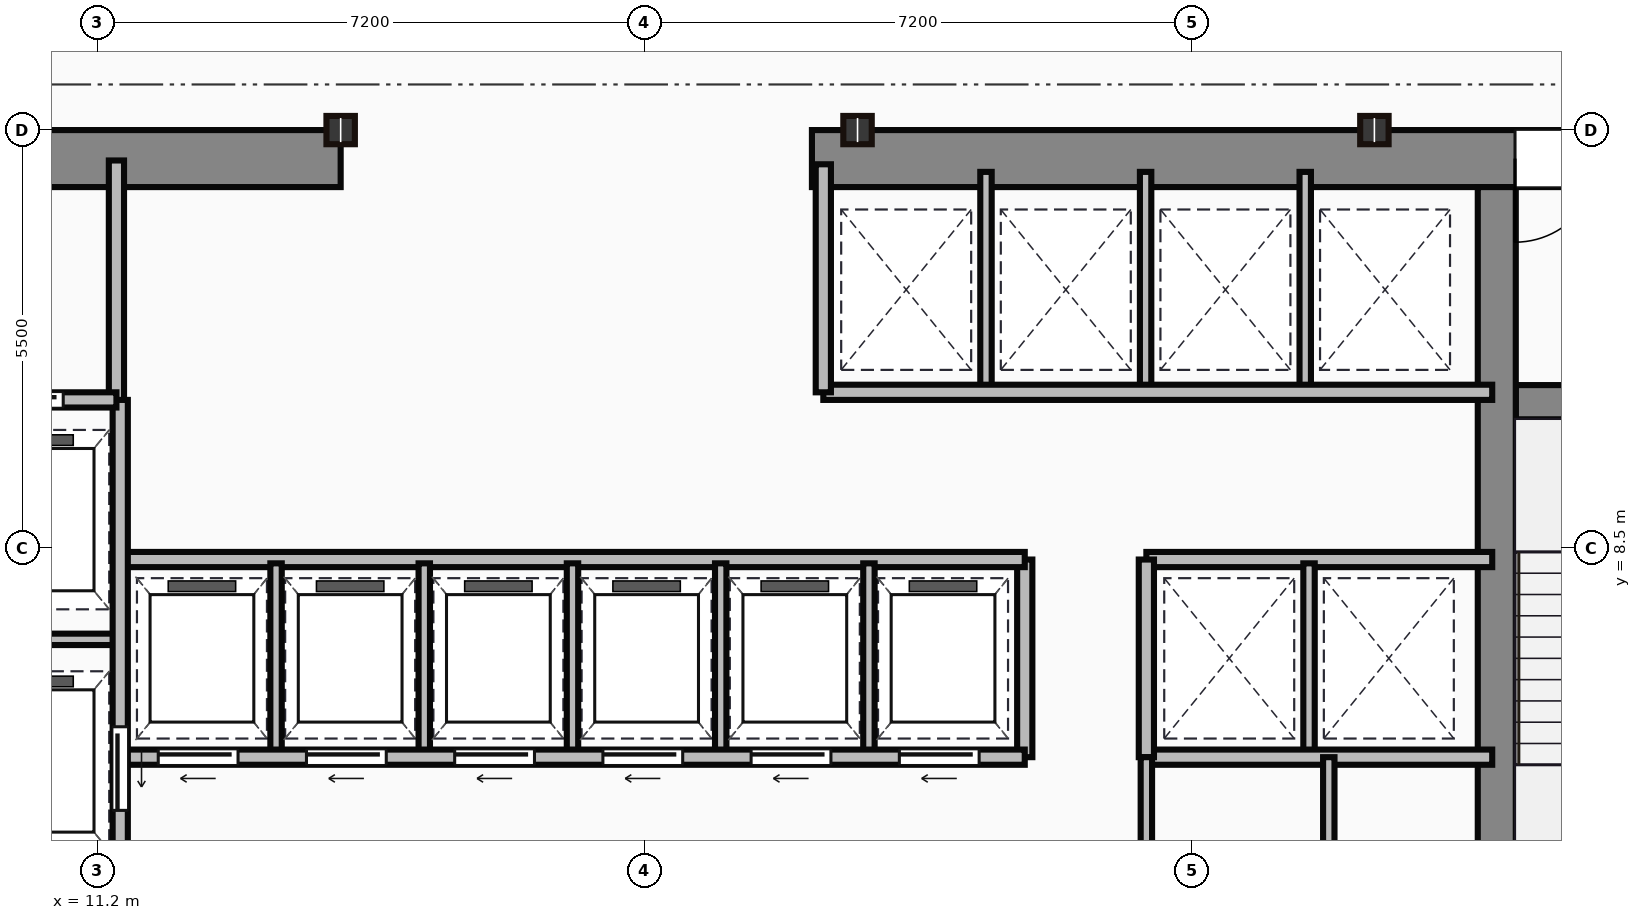
"""IFC4 building model, lengths in metres.
Left out: names, types, materials, properties, quantities, classifications, styles, units other than length and angle.
Written with IfcOpenShell. Run it as: python <this file> out.ifc"""

import sys

from ifc_helpers import new_model, si_unit, direction, frame, frame_2d, origin, origin_2d, place, context, subcontext, project, spatial, rectangle, i_section, extrude, source, transform, mapped, element, fill, save


model = new_model("IFC4")
c1 = context("Model", 3, precision=1e-05, world=origin(), true_north=direction((0.0, 1.0)))
c2 = subcontext(c1, "Body", "Model", "MODEL_VIEW")
j1 = project(units=[si_unit("LENGTHUNIT", "METRE"), si_unit("PLANEANGLEUNIT", "RADIAN")], contexts=[c1])
p1 = place(None, origin())
s1 = spatial("IfcSite", under=j1, at=p1, CompositionType="ELEMENT")
p2 = place(p1, origin())
s2 = spatial("IfcBuilding", under=s1, at=p2, CompositionType="ELEMENT")
p3 = place(p2, frame((0.0, 0.0, 162.5)))
s3 = spatial("IfcBuildingStorey", under=s2, at=p3, CompositionType="ELEMENT", Elevation=162.5)
m1 = source(origin(), c2, "Body", "SweptSolid", [
    extrude(rectangle(XDim=9.1, YDim=0.75, at=frame_2d((4.55, 0.0))), origin(), (0.0, 0.0, 1.0), 3.65),
])
p4 = place(p3, frame((5.3, 13.625, 0.0), z_axis=(0.0, 0.0, 1.0), x_axis=(1.0, 0.0, 0.0)))
e1 = element("IfcWall", 1, at=p4, inside=s3, PredefinedType="SHEAR", context=c2, shape_type="MappedRepresentation", body=[
    mapped(m1, transform((0.0, 0.0, 0.0))),
])
p5 = place(p4, frame((4.1, 0.0, 0.0)))
e2 = element("IfcOpeningElement", 2, at=p5, cuts=e1, PredefinedType="OPENING", context=c2, shape_type="SweptSolid", body=[
    extrude(rectangle(XDim=1.1, YDim=2.15, at=frame_2d((0.55, 1.075))), frame((0.0, 0.385, 0.0), z_axis=(0.0, -1.0, 0.0), x_axis=(1.0, 0.0, 0.0)), (0.0, 0.0, 1.0), 0.77),
])
m2 = source(origin(), c2, "Body", "SweptSolid", [
    extrude(rectangle(XDim=12.6, YDim=0.75, at=frame_2d((6.3, 0.0))), origin(), (0.0, 0.0, 1.0), 3.65),
])
p6 = place(p3, frame((20.6, 13.625, 0.0), z_axis=(0.0, 0.0, 1.0), x_axis=(1.0, 0.0, 0.0)))
e3 = element("IfcWall", 3, at=p6, inside=s3, PredefinedType="SHEAR", context=c2, shape_type="MappedRepresentation", body=[
    mapped(m2, transform((0.0, 0.0, 0.0))),
])
p7 = place(p6, frame((9.25, 0.0, 0.0)))
e4 = element("IfcOpeningElement", 4, at=p7, cuts=e3, PredefinedType="OPENING", context=c2, shape_type="SweptSolid", body=[
    extrude(rectangle(XDim=1.1, YDim=2.15, at=frame_2d((0.55, 1.075))), frame((0.0, 0.385, 0.0), z_axis=(0.0, -1.0, 0.0), x_axis=(1.0, 0.0, 0.0)), (0.0, 0.0, 1.0), 0.77),
])
m3 = source(origin(), c2, "Body", "SweptSolid", [
    extrude(rectangle(XDim=12.35, YDim=0.5, at=frame_2d((6.175, 0.0))), origin(), (0.0, 0.0, 1.0), 3.65),
])
p8 = place(p3, frame((29.61, 0.9, 0.0), z_axis=(0.0, 0.0, 1.0), x_axis=(0.0, 1.0, 0.0)))
e5 = element("IfcWall", 5, at=p8, inside=s3, PredefinedType="SHEAR", context=c2, shape_type="MappedRepresentation", body=[
    mapped(m3, transform((0.0, 0.0, 0.0))),
])
m4 = source(origin(), c2, "Body", "SweptSolid", [
    extrude(rectangle(XDim=3.39, YDim=0.45, at=frame_2d((1.695, 0.0))), origin(), (0.0, 0.0, 1.0), 3.65),
])
p9 = place(p3, frame((29.86, 10.42, 0.0), z_axis=(0.0, 0.0, 1.0), x_axis=(1.0, 0.0, 0.0)))
e6 = element("IfcWall", 6, at=p9, inside=s3, PredefinedType="SHEAR", context=c2, shape_type="MappedRepresentation", body=[
    mapped(m4, transform((0.0, 0.0, 0.0))),
])
p10 = place(p9, frame((1.1, 0.0, 0.0)))
e7 = element("IfcOpeningElement", 7, at=p10, cuts=e6, PredefinedType="OPENING", context=c2, shape_type="SweptSolid", body=[
    extrude(rectangle(XDim=1.1, YDim=2.15, at=frame_2d((0.55, 1.075))), frame((0.0, 0.235, 0.0), z_axis=(0.0, -1.0, 0.0), x_axis=(1.0, 0.0, 0.0)), (0.0, 0.0, 1.0), 0.47),
])
m5 = source(origin(), c2, "Body", "SweptSolid", [
    extrude(i_section(OverallWidth=0.374, OverallDepth=0.372, WebThickness=0.016, FlangeThickness=0.026, at=origin_2d()), origin(), (0.0, 0.0, 1.0), 3.65),
])
for number, where, z_axis, x_axis in (
    (8, (14.4, 14.0, 0.0), (0.0, 0.0, 1.0), (1.0, 0.0, 0.0)),
    (9, (21.2, 14.0, 0.0), (0.0, 0.0, 1.0), (1.0, 0.0, 0.0)),
    (10, (28.0, 14.0, 0.0), (0.0, 0.0, 1.0), (1.0, 0.0, 0.0)),
):
    element("IfcColumn", number, at=place(p3, frame(where, z_axis=z_axis, x_axis=x_axis)), inside=s3, PredefinedType="COLUMN", context=c2, shape_type="MappedRepresentation", body=[
        mapped(m5, transform((0.0, 0.0, 0.0))),
    ])
m6 = source(origin(), c2, "Body", "SweptSolid", [
    extrude(rectangle(XDim=3.18, YDim=0.2, at=frame_2d((1.59, 0.0))), origin(), (0.0, 0.0, 1.0), 3.4),
])
p11 = place(p3, frame((11.45, 10.42, 0.0), z_axis=(0.0, 0.0, 1.0), x_axis=(0.0, 1.0, 0.0)))
e11 = element("IfcWall", 11, at=p11, inside=s3, PredefinedType="PARTITIONING", context=c2, shape_type="MappedRepresentation", body=[
    mapped(m6, transform((0.0, 0.0, 0.0))),
])
m7 = source(origin(), c2, "Body", "SweptSolid", [
    extrude(rectangle(XDim=2.35, YDim=0.2, at=frame_2d((1.175, 0.0))), origin(), (0.0, 0.0, 1.0), 3.4),
])
p12 = place(p3, frame((9.1, 10.45, 0.0), z_axis=(0.0, 0.0, 1.0), x_axis=(1.0, 0.0, 0.0)))
e12 = element("IfcWall", 12, at=p12, inside=s3, PredefinedType="PARTITIONING", context=c2, shape_type="MappedRepresentation", body=[
    mapped(m7, transform((0.0, 0.0, 0.0))),
])
p13 = place(p12, frame((0.55, 0.0, 0.0)))
e13 = element("IfcOpeningElement", 13, at=p13, cuts=e12, PredefinedType="OPENING", context=c2, shape_type="SweptSolid", body=[
    extrude(rectangle(XDim=1.1, YDim=2.15, at=frame_2d((0.55, 1.075))), frame((0.0, 0.11, 0.0), z_axis=(0.0, -1.0, 0.0), x_axis=(1.0, 0.0, 0.0)), (0.0, 0.0, 1.0), 0.22),
])
m8 = source(origin(), c2, "Body", "SweptSolid", [
    extrude(rectangle(XDim=9.6, YDim=0.2, at=frame_2d((4.8, 0.0))), origin(), (0.0, 0.0, 1.0), 3.4),
])
p14 = place(p3, frame((11.5, 0.85, 0.0), z_axis=(0.0, 0.0, 1.0), x_axis=(0.0, 1.0, 0.0)))
e14 = element("IfcWall", 14, at=p14, inside=s3, PredefinedType="PARTITIONING", context=c2, shape_type="MappedRepresentation", body=[
    mapped(m8, transform((0.0, 0.0, 0.0))),
])
p15 = place(p14, frame((4.2, 0.0, 0.0)))
e15 = element("IfcOpeningElement", 15, at=p15, cuts=e14, PredefinedType="OPENING", context=c2, shape_type="SweptSolid", body=[
    extrude(rectangle(XDim=1.1, YDim=2.15, at=frame_2d((0.55, 1.075))), frame((0.0, 0.11, 0.0), z_axis=(0.0, -1.0, 0.0), x_axis=(1.0, 0.0, 0.0)), (0.0, 0.0, 1.0), 0.22),
])
p16 = place(p14, frame((0.9, 0.0, 0.0)))
e16 = element("IfcOpeningElement", 16, at=p16, cuts=e14, PredefinedType="OPENING", context=c2, shape_type="SweptSolid", body=[
    extrude(rectangle(XDim=1.2, YDim=2.15, at=frame_2d((0.6, 1.075))), frame((0.0, 0.11, 0.0), z_axis=(0.0, -1.0, 0.0), x_axis=(1.0, 0.0, 0.0)), (0.0, 0.0, 1.0), 0.22),
])
m9 = source(origin(), c2, "Body", "SweptSolid", [
    extrude(rectangle(XDim=2.4, YDim=0.15, at=frame_2d((1.2, 0.0))), origin(), (0.0, 0.0, 1.0), 3.4),
])
p17 = place(p3, frame((9.1, 7.3, 0.0), z_axis=(0.0, 0.0, 1.0), x_axis=(1.0, 0.0, 0.0)))
e17 = element("IfcWall", 17, at=p17, inside=s3, PredefinedType="PARTITIONING", context=c2, shape_type="MappedRepresentation", body=[
    mapped(m9, transform((0.0, 0.0, 0.0))),
])
m10 = source(origin(), c2, "Body", "SweptSolid", [
    extrude(rectangle(XDim=11.85, YDim=0.2, at=frame_2d((5.925, 0.0))), origin(), (0.0, 0.0, 1.0), 3.4),
])
p18 = place(p3, frame((11.55, 5.75, 0.0), z_axis=(0.0, 0.0, 1.0), x_axis=(1.0, 0.0, 0.0)))
e18 = element("IfcWall", 18, at=p18, inside=s3, PredefinedType="PARTITIONING", context=c2, shape_type="MappedRepresentation", body=[
    mapped(m10, transform((0.0, 0.0, 0.0))),
])
p19 = place(p18, frame((0.45, 0.0, 0.0)))
e19 = element("IfcOpeningElement", 19, at=p19, cuts=e18, PredefinedType="OPENING", context=c2, shape_type="SweptSolid", body=[
    extrude(rectangle(XDim=1.05, YDim=2.15, at=frame_2d((0.525, 1.075))), frame((0.0, 0.11, 0.0), z_axis=(0.0, -1.0, 0.0), x_axis=(1.0, 0.0, 0.0)), (0.0, 0.0, 1.0), 0.22),
])
p20 = place(p18, frame((2.4, 0.0, 0.0)))
e20 = element("IfcOpeningElement", 20, at=p20, cuts=e18, PredefinedType="OPENING", context=c2, shape_type="SweptSolid", body=[
    extrude(rectangle(XDim=1.05, YDim=2.15, at=frame_2d((0.525, 1.075))), frame((0.0, 0.11, 0.0), z_axis=(0.0, -1.0, 0.0), x_axis=(1.0, 0.0, 0.0)), (0.0, 0.0, 1.0), 0.22),
])
p21 = place(p18, frame((4.35, 0.0, 0.0)))
e21 = element("IfcOpeningElement", 21, at=p21, cuts=e18, PredefinedType="OPENING", context=c2, shape_type="SweptSolid", body=[
    extrude(rectangle(XDim=1.05, YDim=2.15, at=frame_2d((0.525, 1.075))), frame((0.0, 0.11, 0.0), z_axis=(0.0, -1.0, 0.0), x_axis=(1.0, 0.0, 0.0)), (0.0, 0.0, 1.0), 0.22),
])
p22 = place(p18, frame((6.3, 0.0, 0.0)))
e22 = element("IfcOpeningElement", 22, at=p22, cuts=e18, PredefinedType="OPENING", context=c2, shape_type="SweptSolid", body=[
    extrude(rectangle(XDim=1.05, YDim=2.15, at=frame_2d((0.525, 1.075))), frame((0.0, 0.11, 0.0), z_axis=(0.0, -1.0, 0.0), x_axis=(1.0, 0.0, 0.0)), (0.0, 0.0, 1.0), 0.22),
])
p23 = place(p18, frame((8.25, 0.0, 0.0)))
e23 = element("IfcOpeningElement", 23, at=p23, cuts=e18, PredefinedType="OPENING", context=c2, shape_type="SweptSolid", body=[
    extrude(rectangle(XDim=1.05, YDim=2.15, at=frame_2d((0.525, 1.075))), frame((0.0, 0.11, 0.0), z_axis=(0.0, -1.0, 0.0), x_axis=(1.0, 0.0, 0.0)), (0.0, 0.0, 1.0), 0.22),
])
p24 = place(p18, frame((10.2, 0.0, 0.0)))
e24 = element("IfcOpeningElement", 24, at=p24, cuts=e18, PredefinedType="OPENING", context=c2, shape_type="SweptSolid", body=[
    extrude(rectangle(XDim=1.05, YDim=2.15, at=frame_2d((0.525, 1.075))), frame((0.0, 0.11, 0.0), z_axis=(0.0, -1.0, 0.0), x_axis=(1.0, 0.0, 0.0)), (0.0, 0.0, 1.0), 0.22),
])
p25 = place(p3, frame((11.55, 8.35, 0.0), z_axis=(0.0, 0.0, 1.0), x_axis=(1.0, 0.0, 0.0)))
e25 = element("IfcWall", 25, at=p25, inside=s3, PredefinedType="PARTITIONING", context=c2, shape_type="MappedRepresentation", body=[
    mapped(m10, transform((0.0, 0.0, 0.0))),
])
m11 = source(origin(), c2, "Body", "SweptSolid", [
    extrude(rectangle(XDim=2.6, YDim=0.2, at=frame_2d((1.3, 0.0))), origin(), (0.0, 0.0, 1.0), 3.4),
])
p26 = place(p3, frame((23.4, 5.75, 0.0), z_axis=(0.0, 0.0, 1.0), x_axis=(0.0, 1.0, 0.0)))
e26 = element("IfcWall", 26, at=p26, inside=s3, PredefinedType="PARTITIONING", context=c2, shape_type="MappedRepresentation", body=[
    mapped(m11, transform((0.0, 0.0, 0.0))),
])
m12 = source(origin(), c2, "Body", "SweptSolid", [
    extrude(rectangle(XDim=2.5, YDim=0.15, at=frame_2d((1.25, 0.0))), origin(), (0.0, 0.0, 1.0), 3.4),
])
for number, where, z_axis, x_axis in (
    (27, (13.55, 5.8, 0.0), (0.0, 0.0, 1.0), (0.0, 1.0, 0.0)),
    (28, (15.5, 5.8, 0.0), (0.0, 0.0, 1.0), (0.0, 1.0, 0.0)),
    (29, (17.45, 5.8, 0.0), (0.0, 0.0, 1.0), (0.0, 1.0, 0.0)),
    (30, (19.4, 5.8, 0.0), (0.0, 0.0, 1.0), (0.0, 1.0, 0.0)),
    (31, (21.35, 5.8, 0.0), (0.0, 0.0, 1.0), (0.0, 1.0, 0.0)),
):
    element("IfcWall", number, at=place(p3, frame(where, z_axis=z_axis, x_axis=x_axis)), inside=s3, PredefinedType="PARTITIONING", context=c2, shape_type="MappedRepresentation", body=[
        mapped(m12, transform((0.0, 0.0, 0.0))),
    ])
m13 = source(origin(), c2, "Body", "SweptSolid", [
    extrude(rectangle(XDim=8.8, YDim=0.2, at=frame_2d((4.4, 0.0))), origin(), (0.0, 0.0, 1.0), 3.4),
])
p27 = place(p3, frame((20.75, 10.55, 0.0), z_axis=(0.0, 0.0, 1.0), x_axis=(1.0, 0.0, 0.0)))
e32 = element("IfcWall", 32, at=p27, inside=s3, PredefinedType="PARTITIONING", context=c2, shape_type="MappedRepresentation", body=[
    mapped(m13, transform((0.0, 0.0, 0.0))),
])
m14 = source(origin(), c2, "Body", "SweptSolid", [
    extrude(rectangle(XDim=3.0, YDim=0.2, at=frame_2d((1.5, 0.0))), origin(), (0.0, 0.0, 1.0), 3.4),
])
p28 = place(p3, frame((20.75, 10.55, 0.0), z_axis=(0.0, 0.0, 1.0), x_axis=(0.0, 1.0, 0.0)))
e33 = element("IfcWall", 33, at=p28, inside=s3, PredefinedType="PARTITIONING", context=c2, shape_type="MappedRepresentation", body=[
    mapped(m14, transform((0.0, 0.0, 0.0))),
])
m15 = source(origin(), c2, "Body", "SweptSolid", [
    extrude(rectangle(XDim=2.85, YDim=0.15, at=frame_2d((1.425, 0.0))), origin(), (0.0, 0.0, 1.0), 3.4),
])
for number, where, z_axis, x_axis in (
    (34, (22.89, 10.6, 0.0), (0.0, 0.0, 1.0), (0.0, 1.0, 0.0)),
    (35, (24.99, 10.6, 0.0), (0.0, 0.0, 1.0), (0.0, 1.0, 0.0)),
    (36, (27.09, 10.6, 0.0), (0.0, 0.0, 1.0), (0.0, 1.0, 0.0)),
):
    element("IfcWall", number, at=place(p3, frame(where, z_axis=z_axis, x_axis=x_axis)), inside=s3, PredefinedType="PARTITIONING", context=c2, shape_type="MappedRepresentation", body=[
        mapped(m15, transform((0.0, 0.0, 0.0))),
    ])
m16 = source(origin(), c2, "Body", "SweptSolid", [
    extrude(rectangle(XDim=4.55, YDim=0.2, at=frame_2d((2.275, 0.0))), origin(), (0.0, 0.0, 1.0), 3.4),
])
for number, where, z_axis, x_axis in (
    (37, (25.0, 8.35, 0.0), (0.0, 0.0, 1.0), (1.0, 0.0, 0.0)),
    (38, (25.0, 5.75, 0.0), (0.0, 0.0, 1.0), (1.0, 0.0, 0.0)),
):
    element("IfcWall", number, at=place(p3, frame(where, z_axis=z_axis, x_axis=x_axis)), inside=s3, PredefinedType="PARTITIONING", context=c2, shape_type="MappedRepresentation", body=[
        mapped(m16, transform((0.0, 0.0, 0.0))),
    ])
p29 = place(p3, frame((25.0, 5.75, 0.0), z_axis=(0.0, 0.0, 1.0), x_axis=(0.0, 1.0, 0.0)))
e39 = element("IfcWall", 39, at=p29, inside=s3, PredefinedType="PARTITIONING", context=c2, shape_type="MappedRepresentation", body=[
    mapped(m11, transform((0.0, 0.0, 0.0))),
])
p30 = place(p3, frame((27.14, 5.8, 0.0), z_axis=(0.0, 0.0, 1.0), x_axis=(0.0, 1.0, 0.0)))
e40 = element("IfcWall", 40, at=p30, inside=s3, PredefinedType="PARTITIONING", context=c2, shape_type="MappedRepresentation", body=[
    mapped(m12, transform((0.0, 0.0, 0.0))),
])
m17 = source(origin(), c2, "Body", "SweptSolid", [
    extrude(rectangle(XDim=4.9, YDim=0.15, at=frame_2d((2.45, 0.0))), origin(), (0.0, 0.0, 1.0), 3.4),
])
p31 = place(p3, frame((25.0, 0.85, 0.0), z_axis=(0.0, 0.0, 1.0), x_axis=(0.0, 1.0, 0.0)))
e41 = element("IfcWall", 41, at=p31, inside=s3, PredefinedType="PARTITIONING", context=c2, shape_type="MappedRepresentation", body=[
    mapped(m17, transform((0.0, 0.0, 0.0))),
])
p32 = place(p31, frame((2.5, 0.0, 0.0)))
e42 = element("IfcOpeningElement", 42, at=p32, cuts=e41, PredefinedType="OPENING", context=c2, shape_type="SweptSolid", body=[
    extrude(rectangle(XDim=0.95, YDim=2.15, at=frame_2d((0.475, 1.075))), frame((0.0, 0.085, 0.0), z_axis=(0.0, -1.0, 0.0), x_axis=(1.0, 0.0, 0.0)), (0.0, 0.0, 1.0), 0.17),
])
m18 = source(origin(), c2, "Body", "SweptSolid", [
    extrude(rectangle(XDim=3.4, YDim=0.15, at=frame_2d((1.7, 0.0))), origin(), (0.0, 0.0, 1.0), 3.4),
])
p33 = place(p3, frame((27.4, 2.35, 0.0), z_axis=(0.0, 0.0, 1.0), x_axis=(0.0, 1.0, 0.0)))
e43 = element("IfcWall", 43, at=p33, inside=s3, PredefinedType="PARTITIONING", context=c2, shape_type="MappedRepresentation", body=[
    mapped(m18, transform((0.0, 0.0, 0.0))),
])
p34 = place(p33, frame((1.1, 0.0, 0.0)))
e44 = element("IfcOpeningElement", 44, at=p34, cuts=e43, PredefinedType="OPENING", context=c2, shape_type="SweptSolid", body=[
    extrude(rectangle(XDim=0.85, YDim=2.1, at=frame_2d((0.425, 1.05))), frame((0.0, 0.085, 0.0), z_axis=(0.0, -1.0, 0.0), x_axis=(1.0, 0.0, 0.0)), (0.0, 0.0, 1.0), 0.17),
])
m19 = source(origin(), c2, "Body", "SweptSolid", [
    extrude(rectangle(XDim=1.1, YDim=2.15, at=frame_2d((0.55, 1.075))), frame((0.0, 0.025, 0.0), z_axis=(0.0, -1.0, 0.0), x_axis=(1.0, 0.0, 0.0)), (0.0, 0.0, 1.0), 0.05),
])
p35 = place(p7, origin())
e45 = element("IfcDoor", 45, at=p35, inside=s3, OperationType="SINGLE_SWING_LEFT", PredefinedType="DOOR", context=c2, shape_type="MappedRepresentation", body=[
    mapped(m19, transform((0.0, 0.0, 0.0))),
])
fill(e4, e45)
p36 = place(p13, origin())
e46 = element("IfcDoor", 46, at=p36, inside=s3, OperationType="SLIDING_TO_LEFT", PredefinedType="DOOR", context=c2, shape_type="MappedRepresentation", body=[
    mapped(m19, transform((0.0, 0.0, 0.0))),
])
fill(e13, e46)
p37 = place(p15, frame((1.1, 0.0, 0.0), z_axis=(0.0, 0.0, 1.0), x_axis=(-1.0, 0.0, 0.0)))
e47 = element("IfcDoor", 47, at=p37, inside=s3, OperationType="SLIDING_TO_LEFT", PredefinedType="DOOR", context=c2, shape_type="MappedRepresentation", body=[
    mapped(m19, transform((0.0, 0.0, 0.0))),
])
fill(e15, e47)
m20 = source(origin(), c2, "Body", "SweptSolid", [
    extrude(rectangle(XDim=1.05, YDim=2.15, at=frame_2d((0.525, 1.075))), frame((0.0, 0.025, 0.0), z_axis=(0.0, -1.0, 0.0), x_axis=(1.0, 0.0, 0.0)), (0.0, 0.0, 1.0), 0.05),
])
p38 = place(p19, frame((1.05, 0.0, 0.0), z_axis=(0.0, 0.0, 1.0), x_axis=(-1.0, 0.0, 0.0)))
e48 = element("IfcDoor", 48, at=p38, inside=s3, OperationType="SLIDING_TO_LEFT", PredefinedType="DOOR", context=c2, shape_type="MappedRepresentation", body=[
    mapped(m20, transform((0.0, 0.0, 0.0))),
])
fill(e19, e48)
p39 = place(p20, frame((1.05, 0.0, 0.0), z_axis=(0.0, 0.0, 1.0), x_axis=(-1.0, 0.0, 0.0)))
e49 = element("IfcDoor", 49, at=p39, inside=s3, OperationType="SLIDING_TO_LEFT", PredefinedType="DOOR", context=c2, shape_type="MappedRepresentation", body=[
    mapped(m20, transform((0.0, 0.0, 0.0))),
])
fill(e20, e49)
p40 = place(p21, frame((1.05, 0.0, 0.0), z_axis=(0.0, 0.0, 1.0), x_axis=(-1.0, 0.0, 0.0)))
e50 = element("IfcDoor", 50, at=p40, inside=s3, OperationType="SLIDING_TO_LEFT", PredefinedType="DOOR", context=c2, shape_type="MappedRepresentation", body=[
    mapped(m20, transform((0.0, 0.0, 0.0))),
])
fill(e21, e50)
p41 = place(p22, frame((1.05, 0.0, 0.0), z_axis=(0.0, 0.0, 1.0), x_axis=(-1.0, 0.0, 0.0)))
e51 = element("IfcDoor", 51, at=p41, inside=s3, OperationType="SLIDING_TO_LEFT", PredefinedType="DOOR", context=c2, shape_type="MappedRepresentation", body=[
    mapped(m20, transform((0.0, 0.0, 0.0))),
])
fill(e22, e51)
p42 = place(p23, frame((1.05, 0.0, 0.0), z_axis=(0.0, 0.0, 1.0), x_axis=(-1.0, 0.0, 0.0)))
e52 = element("IfcDoor", 52, at=p42, inside=s3, OperationType="SLIDING_TO_LEFT", PredefinedType="DOOR", context=c2, shape_type="MappedRepresentation", body=[
    mapped(m20, transform((0.0, 0.0, 0.0))),
])
fill(e23, e52)
p43 = place(p24, frame((1.05, 0.0, 0.0), z_axis=(0.0, 0.0, 1.0), x_axis=(-1.0, 0.0, 0.0)))
e53 = element("IfcDoor", 53, at=p43, inside=s3, OperationType="SLIDING_TO_LEFT", PredefinedType="DOOR", context=c2, shape_type="MappedRepresentation", body=[
    mapped(m20, transform((0.0, 0.0, 0.0))),
])
fill(e24, e53)
save(model, sys.argv[1])
